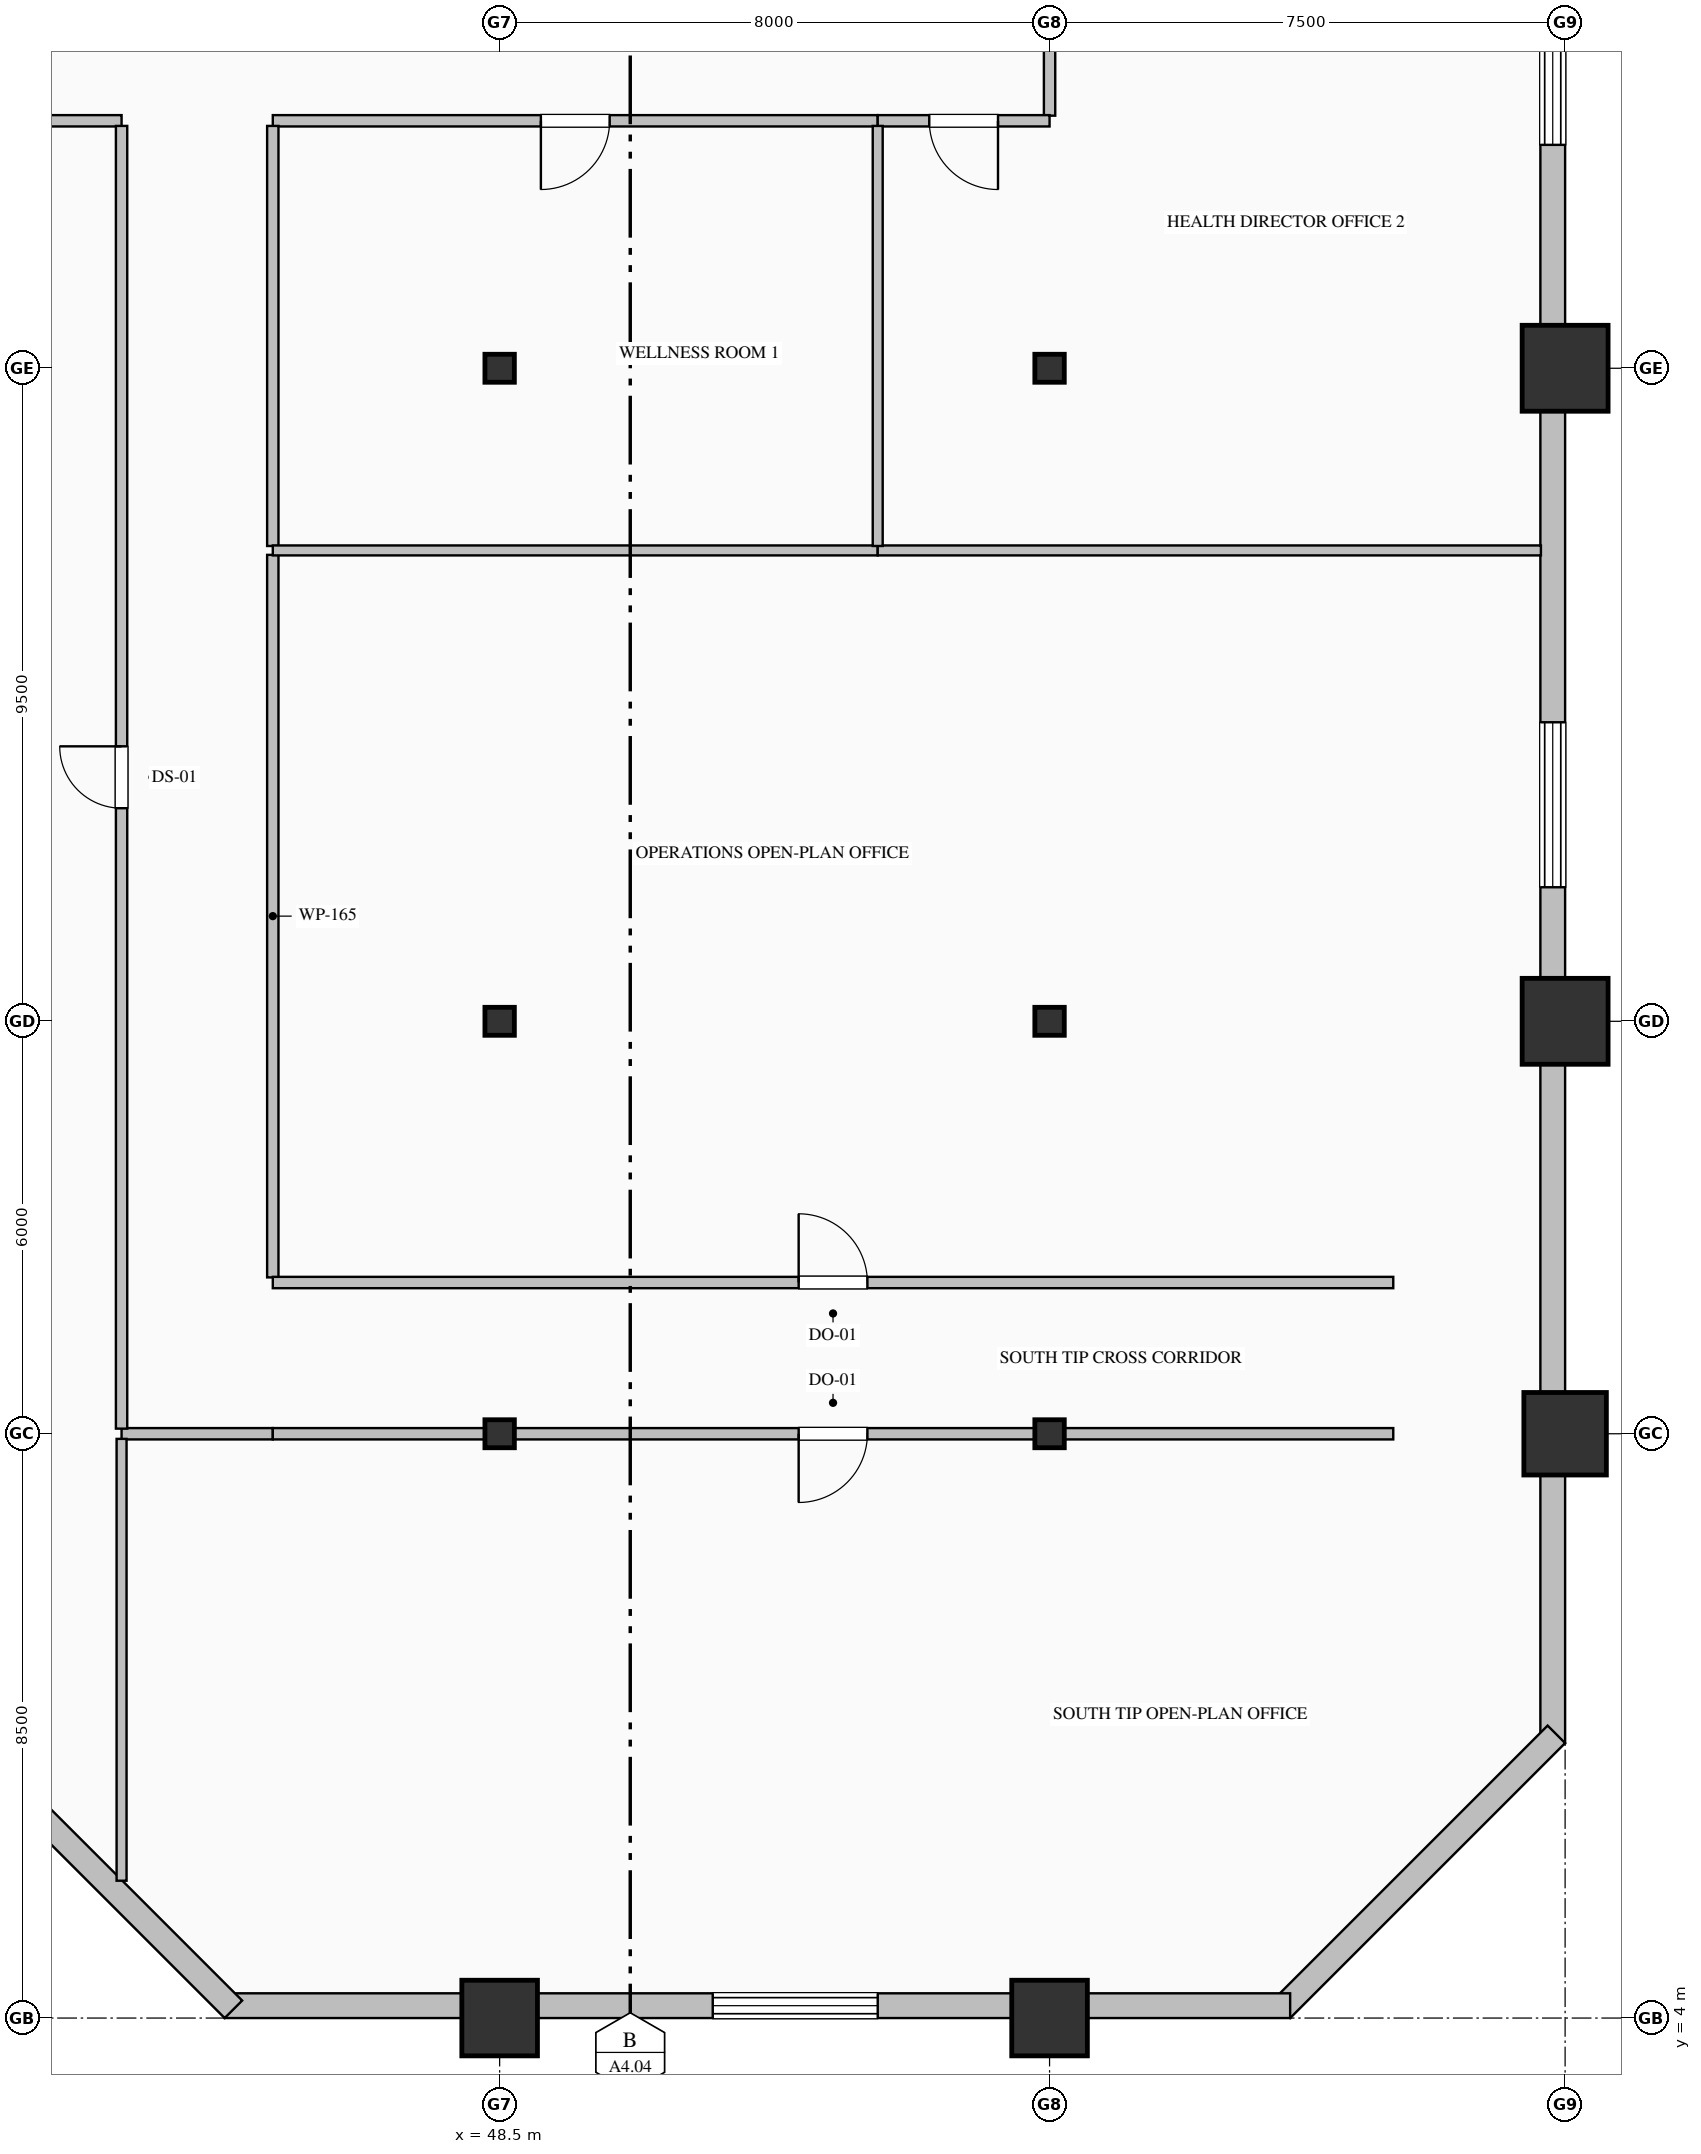
"""IFC4 building model, lengths in metres.
Left out: names, types, materials, properties, quantities, classifications, styles, units other than length and angle.
Written with IfcOpenShell. Run it as: python <this file> out.ifc"""

import sys

from ifc_helpers import new_model, si_unit, direction, frame, frame_2d, origin, origin_2d, place, context, subcontext, project, spatial, rectangle, hollow_rectangle, hollow_circle, i_section, extrude, element, fill, save


model = new_model("IFC4")
c1 = context("Model", 3, precision=1e-05, world=origin(), true_north=direction((0.0, 1.0)))
c2 = subcontext(c1, "Body", "Model", "MODEL_VIEW")
j1 = project(units=[si_unit("LENGTHUNIT", "METRE"), si_unit("PLANEANGLEUNIT", "RADIAN")], contexts=[c1])
p1 = place(None, origin())
s1 = spatial("IfcSite", under=j1, at=p1, CompositionType="ELEMENT")
p2 = place(p1, origin())
s2 = spatial("IfcBuilding", under=s1, at=p2, CompositionType="ELEMENT")
p3 = place(p2, frame((0.0, 0.0, 84.2)))
s3 = spatial("IfcBuildingStorey", under=s2, at=p3, CompositionType="ELEMENT", Elevation=84.2)
p4 = place(p3, frame((48.5, 4.0, 0.0), z_axis=(0.0, 0.0, 1.0), x_axis=(1.0, 0.0, 0.0)))
e1 = element("IfcColumn", 1, at=p4, inside=s3, PredefinedType="COLUMN", context=c2, shape_type="SweptSolid", body=[
    extrude(hollow_rectangle(XDim=1.1, YDim=1.1, WallThickness=0.04, at=origin_2d()), origin(), (0.0, 0.0, 1.0), 4.0),
])
for number, where, z_axis, x_axis in (
    (2, (48.5, 12.5, 0.0), (0.0, 0.0, 1.0), (1.0, 0.0, 0.0)),
    (3, (48.5, 18.5, 0.0), (0.0, 0.0, 1.0), (1.0, 0.0, 0.0)),
    (4, (48.5, 28.0, 0.0), (0.0, 0.0, 1.0), (1.0, 0.0, 0.0)),
):
    element("IfcColumn", number, at=place(p3, frame(where, z_axis=z_axis, x_axis=x_axis)), inside=s3, PredefinedType="COLUMN", context=c2, shape_type="SweptSolid", body=[
        extrude(i_section(OverallWidth=0.407, OverallDepth=0.428, WebThickness=0.02, FlangeThickness=0.035, FilletRadius=0.022, at=origin_2d()), origin(), (0.0, 0.0, 1.0), 4.0),
    ])
p5 = place(p3, frame((56.5, 4.0, 0.0), z_axis=(0.0, 0.0, 1.0), x_axis=(1.0, 0.0, 0.0)))
e5 = element("IfcColumn", 5, at=p5, inside=s3, PredefinedType="COLUMN", context=c2, shape_type="SweptSolid", body=[
    extrude(hollow_rectangle(XDim=1.1, YDim=1.1, WallThickness=0.04, at=origin_2d()), origin(), (0.0, 0.0, 1.0), 4.0),
])
for number, where, z_axis, x_axis in (
    (6, (56.5, 12.5, 0.0), (0.0, 0.0, 1.0), (1.0, 0.0, 0.0)),
    (7, (56.5, 18.5, 0.0), (0.0, 0.0, 1.0), (1.0, 0.0, 0.0)),
    (8, (56.5, 28.0, 0.0), (0.0, 0.0, 1.0), (1.0, 0.0, 0.0)),
):
    element("IfcColumn", number, at=place(p3, frame(where, z_axis=z_axis, x_axis=x_axis)), inside=s3, PredefinedType="COLUMN", context=c2, shape_type="SweptSolid", body=[
        extrude(i_section(OverallWidth=0.407, OverallDepth=0.428, WebThickness=0.02, FlangeThickness=0.035, FilletRadius=0.022, at=origin_2d()), origin(), (0.0, 0.0, 1.0), 4.0),
    ])
p6 = place(p3, frame((64.0, 12.5, 0.0), z_axis=(0.0, 0.0, 1.0), x_axis=(1.0, 0.0, 0.0)))
e9 = element("IfcColumn", 9, at=p6, inside=s3, PredefinedType="COLUMN", context=c2, shape_type="SweptSolid", body=[
    extrude(hollow_circle(Radius=0.6, WallThickness=0.04, at=origin_2d()), origin(), (0.0, 0.0, 1.0), 4.0),
])
for number, where, z_axis, x_axis in (
    (10, (64.0, 18.5, 0.0), (0.0, 0.0, 1.0), (1.0, 0.0, 0.0)),
    (11, (64.0, 28.0, 0.0), (0.0, 0.0, 1.0), (1.0, 0.0, 0.0)),
):
    element("IfcColumn", number, at=place(p3, frame(where, z_axis=z_axis, x_axis=x_axis)), inside=s3, PredefinedType="COLUMN", context=c2, shape_type="SweptSolid", body=[
        extrude(hollow_rectangle(XDim=1.25, YDim=1.25, WallThickness=0.045, at=origin_2d()), origin(), (0.0, 0.0, 1.0), 4.0),
    ])
p7 = place(p3, frame((63.82, 36.05, 0.0), z_axis=(0.0, 0.0, 1.0), x_axis=(0.0, -1.0, 0.0)))
e12 = element("IfcWall", 12, at=p7, inside=s3, PredefinedType="SOLIDWALL", context=c2, shape_type="SweptSolid", body=[
    extrude(rectangle(XDim=28.05, YDim=0.36, at=frame_2d((14.025, 0.0))), origin(), (0.0, 0.0, 1.0), 3.25),
])
p8 = place(p7, frame((2.4, 0.0, 0.8)))
e13 = element("IfcOpeningElement", 13, at=p8, cuts=e12, PredefinedType="OPENING", context=c2, shape_type="SweptSolid", body=[
    extrude(rectangle(XDim=2.4, YDim=2.15, at=frame_2d((1.2, 1.075))), frame((0.0, 0.19, 0.0), z_axis=(0.0, -1.0, 0.0), x_axis=(1.0, 0.0, 0.0)), (0.0, 0.0, 1.0), 0.38),
])
p9 = place(p7, frame((13.2, 0.0, 0.8)))
e14 = element("IfcOpeningElement", 14, at=p9, cuts=e12, PredefinedType="OPENING", context=c2, shape_type="SweptSolid", body=[
    extrude(rectangle(XDim=2.4, YDim=2.15, at=frame_2d((1.2, 1.075))), frame((0.0, 0.19, 0.0), z_axis=(0.0, -1.0, 0.0), x_axis=(1.0, 0.0, 0.0)), (0.0, 0.0, 1.0), 0.38),
])
p10 = place(p3, frame((63.873, 8.127, 0.0), z_axis=(0.0, 0.0, 1.0), x_axis=(-0.707106781187, -0.707106781187, 0.0)))
e15 = element("IfcWall", 15, at=p10, inside=s3, PredefinedType="SOLIDWALL", context=c2, shape_type="SweptSolid", body=[
    extrude(rectangle(XDim=5.657, YDim=0.36, at=frame_2d((2.828, 0.0))), origin(), (0.0, 0.0, 1.0), 3.75),
])
p11 = place(p3, frame((60.0, 4.18, 0.0), z_axis=(0.0, 0.0, 1.0), x_axis=(-1.0, 0.0, 0.0)))
e16 = element("IfcWall", 16, at=p11, inside=s3, PredefinedType="SOLIDWALL", context=c2, shape_type="SweptSolid", body=[
    extrude(rectangle(XDim=15.5, YDim=0.36, at=frame_2d((7.75, 0.0))), origin(), (0.0, 0.0, 1.0), 3.25),
])
p12 = place(p11, frame((6.0, 0.0, 0.8)))
e17 = element("IfcOpeningElement", 17, at=p12, cuts=e16, PredefinedType="OPENING", context=c2, shape_type="SweptSolid", body=[
    extrude(rectangle(XDim=2.4, YDim=2.15, at=frame_2d((1.2, 1.075))), frame((0.0, 0.19, 0.0), z_axis=(0.0, -1.0, 0.0), x_axis=(1.0, 0.0, 0.0)), (0.0, 0.0, 1.0), 0.38),
])
p13 = place(p3, frame((44.627, 4.127, 0.0), z_axis=(0.0, 0.0, 1.0), x_axis=(-0.707106781187, 0.707106781187, 0.0)))
e18 = element("IfcWall", 18, at=p13, inside=s3, PredefinedType="SOLIDWALL", context=c2, shape_type="SweptSolid", body=[
    extrude(rectangle(XDim=5.657, YDim=0.36, at=frame_2d((2.828, 0.0))), origin(), (0.0, 0.0, 1.0), 3.75),
])
p14 = place(p3, frame((54.0, 31.6, 0.0), z_axis=(0.0, 0.0, 1.0), x_axis=(-1.0, 0.0, 0.0)))
e19 = element("IfcWall", 19, at=p14, inside=s3, PredefinedType="PARTITIONING", context=c2, shape_type="SweptSolid", body=[
    extrude(rectangle(XDim=8.8, YDim=0.165, at=frame_2d((4.4, 0.0))), origin(), (0.0, 0.0, 1.0), 3.75),
])
p15 = place(p14, frame((3.9, 0.0, 0.0)))
e20 = element("IfcOpeningElement", 20, at=p15, cuts=e19, PredefinedType="OPENING", context=c2, shape_type="SweptSolid", body=[
    extrude(rectangle(XDim=1.0, YDim=2.15, at=frame_2d((0.5, 1.075))), frame((0.0, 0.093, 0.0), z_axis=(0.0, -1.0, 0.0), x_axis=(1.0, 0.0, 0.0)), (0.0, 0.0, 1.0), 0.185),
])
p16 = place(p3, frame((56.5, 33.726, 0.0), z_axis=(0.0, 0.0, 1.0), x_axis=(0.0, -1.0, 0.0)))
e21 = element("IfcWall", 21, at=p16, inside=s3, PredefinedType="PARTITIONING", context=c2, shape_type="SweptSolid", body=[
    extrude(rectangle(XDim=2.051, YDim=0.165, at=frame_2d((1.025, 0.0))), origin(), (0.0, 0.0, 1.0), 3.042),
])
p17 = place(p3, frame((56.5, 31.6, 0.0), z_axis=(0.0, 0.0, 1.0), x_axis=(-1.0, 0.0, 0.0)))
e22 = element("IfcWall", 22, at=p17, inside=s3, PredefinedType="PARTITIONING", context=c2, shape_type="SweptSolid", body=[
    extrude(rectangle(XDim=2.5, YDim=0.165, at=frame_2d((1.25, 0.0))), origin(), (0.0, 0.0, 1.0), 3.75),
])
p18 = place(p17, frame((0.75, 0.0, 0.0)))
e23 = element("IfcOpeningElement", 23, at=p18, cuts=e22, PredefinedType="OPENING", context=c2, shape_type="SweptSolid", body=[
    extrude(rectangle(XDim=1.0, YDim=2.15, at=frame_2d((0.5, 1.075))), frame((0.0, 0.093, 0.0), z_axis=(0.0, -1.0, 0.0), x_axis=(1.0, 0.0, 0.0)), (0.0, 0.0, 1.0), 0.185),
])
p19 = place(p3, frame((43.0, 31.6, 0.0), z_axis=(0.0, 0.0, 1.0), x_axis=(-1.0, 0.0, 0.0)))
e24 = element("IfcWall", 24, at=p19, inside=s3, PredefinedType="PARTITIONING", context=c2, shape_type="SweptSolid", body=[
    extrude(rectangle(XDim=2.5, YDim=0.165, at=frame_2d((1.25, 0.0))), origin(), (0.0, 0.0, 1.0), 3.75),
])
p20 = place(p3, frame((45.2, 12.5, 0.0), z_axis=(0.0, 0.0, 1.0), x_axis=(-1.0, 0.0, 0.0)))
e25 = element("IfcWall", 25, at=p20, inside=s3, PredefinedType="PARTITIONING", context=c2, shape_type="SweptSolid", body=[
    extrude(rectangle(XDim=2.2, YDim=0.165, at=frame_2d((1.1, 0.0))), origin(), (0.0, 0.0, 1.0), 3.042),
])
p21 = place(p3, frame((45.2, 25.285, 0.0), z_axis=(0.0, 0.0, 1.0), x_axis=(0.0, -1.0, 0.0)))
e26 = element("IfcWall", 26, at=p21, inside=s3, PredefinedType="PARTITIONING", context=c2, shape_type="SweptSolid", body=[
    extrude(rectangle(XDim=10.511, YDim=0.165, at=frame_2d((5.255, 0.0))), origin(), (0.0, 0.0, 1.0), 3.75),
])
p22 = place(p3, frame((45.2, 31.525, 0.0), z_axis=(0.0, 0.0, 1.0), x_axis=(0.0, -1.0, 0.0)))
e27 = element("IfcWall", 27, at=p22, inside=s3, PredefinedType="PARTITIONING", context=c2, shape_type="SweptSolid", body=[
    extrude(rectangle(XDim=6.111, YDim=0.165, at=frame_2d((3.055, 0.0))), origin(), (0.0, 0.0, 1.0), 3.75),
])
p23 = place(p3, frame((43.0, 12.574, 0.0), z_axis=(0.0, 0.0, 1.0), x_axis=(0.0, 1.0, 0.0)))
e28 = element("IfcWall", 28, at=p23, inside=s3, PredefinedType="PARTITIONING", context=c2, shape_type="SweptSolid", body=[
    extrude(rectangle(XDim=18.951, YDim=0.165, at=frame_2d((9.476, 0.0))), origin(), (0.0, 0.0, 1.0), 3.75),
])
p24 = place(p23, frame((9.025, 0.0, 0.0)))
e29 = element("IfcOpeningElement", 29, at=p24, cuts=e28, PredefinedType="OPENING", context=c2, shape_type="SweptSolid", body=[
    extrude(rectangle(XDim=0.9, YDim=2.15, at=frame_2d((0.45, 1.075))), frame((0.0, 0.093, 0.0), z_axis=(0.0, -1.0, 0.0), x_axis=(1.0, 0.0, 0.0)), (0.0, 0.0, 1.0), 0.185),
])
p25 = place(p3, frame((61.5, 12.5, 0.0), z_axis=(0.0, 0.0, 1.0), x_axis=(-1.0, 0.0, 0.0)))
e30 = element("IfcWall", 30, at=p25, inside=s3, PredefinedType="PARTITIONING", context=c2, shape_type="SweptSolid", body=[
    extrude(rectangle(XDim=16.3, YDim=0.165, at=frame_2d((8.15, 0.0))), origin(), (0.0, 0.0, 1.0), 3.042),
])
p26 = place(p25, frame((7.65, 0.0, 0.0)))
e31 = element("IfcOpeningElement", 31, at=p26, cuts=e30, PredefinedType="OPENING", context=c2, shape_type="SweptSolid", body=[
    extrude(rectangle(XDim=1.0, YDim=2.15, at=frame_2d((0.5, 1.075))), frame((0.0, 0.093, 0.0), z_axis=(0.0, -1.0, 0.0), x_axis=(1.0, 0.0, 0.0)), (0.0, 0.0, 1.0), 0.185),
])
p27 = place(p3, frame((45.2, 14.7, 0.0), z_axis=(0.0, 0.0, 1.0), x_axis=(1.0, 0.0, 0.0)))
e32 = element("IfcWall", 32, at=p27, inside=s3, PredefinedType="PARTITIONING", context=c2, shape_type="SweptSolid", body=[
    extrude(rectangle(XDim=16.3, YDim=0.165, at=frame_2d((8.15, 0.0))), origin(), (0.0, 0.0, 1.0), 3.75),
])
p28 = place(p27, frame((7.65, 0.0, 0.0)))
e33 = element("IfcOpeningElement", 33, at=p28, cuts=e32, PredefinedType="OPENING", context=c2, shape_type="SweptSolid", body=[
    extrude(rectangle(XDim=1.0, YDim=2.15, at=frame_2d((0.5, 1.075))), frame((0.0, 0.093, 0.0), z_axis=(0.0, -1.0, 0.0), x_axis=(1.0, 0.0, 0.0)), (0.0, 0.0, 1.0), 0.185),
])
p29 = place(p3, frame((43.0, 5.998, 0.0), z_axis=(0.0, 0.0, 1.0), x_axis=(0.0, 1.0, 0.0)))
e34 = element("IfcWall", 34, at=p29, inside=s3, PredefinedType="PARTITIONING", context=c2, shape_type="SweptSolid", body=[
    extrude(rectangle(XDim=6.428, YDim=0.145, at=frame_2d((3.214, 0.0))), origin(), (0.0, 0.0, 1.0), 3.75),
])
p30 = place(p3, frame((45.2, 25.35, 0.0), z_axis=(0.0, 0.0, 1.0), x_axis=(1.0, 0.0, 0.0)))
e35 = element("IfcWall", 35, at=p30, inside=s3, PredefinedType="PARTITIONING", context=c2, shape_type="SweptSolid", body=[
    extrude(rectangle(XDim=8.8, YDim=0.145, at=frame_2d((4.4, 0.0))), origin(), (0.0, 0.0, 1.0), 3.75),
])
p31 = place(p3, frame((54.0, 25.35, 0.0), z_axis=(0.0, 0.0, 1.0), x_axis=(1.0, 0.0, 0.0)))
e36 = element("IfcWall", 36, at=p31, inside=s3, PredefinedType="PARTITIONING", context=c2, shape_type="SweptSolid", body=[
    extrude(rectangle(XDim=9.648, YDim=0.145, at=frame_2d((4.824, 0.0))), origin(), (0.0, 0.0, 1.0), 3.75),
])
p32 = place(p3, frame((54.0, 31.525, 0.0), z_axis=(0.0, 0.0, 1.0), x_axis=(0.0, -1.0, 0.0)))
e37 = element("IfcWall", 37, at=p32, inside=s3, PredefinedType="PARTITIONING", context=c2, shape_type="SweptSolid", body=[
    extrude(rectangle(XDim=6.111, YDim=0.145, at=frame_2d((3.055, 0.0))), origin(), (0.0, 0.0, 1.0), 3.75),
])
p33 = place(p8, origin())
e38 = element("IfcWindow", 38, at=p33, inside=s3, PartitioningType="TRIPLE_PANEL_VERTICAL", PredefinedType="WINDOW", context=c2, shape_type="SweptSolid", body=[
    extrude(rectangle(XDim=2.4, YDim=2.15, at=frame_2d((1.2, 1.075))), frame((0.0, 0.15, 0.0), z_axis=(0.0, -1.0, 0.0), x_axis=(1.0, 0.0, 0.0)), (0.0, 0.0, 1.0), 0.06),
])
fill(e13, e38)
p34 = place(p9, origin())
e39 = element("IfcWindow", 39, at=p34, inside=s3, PartitioningType="TRIPLE_PANEL_VERTICAL", PredefinedType="WINDOW", context=c2, shape_type="SweptSolid", body=[
    extrude(rectangle(XDim=2.4, YDim=2.15, at=frame_2d((1.2, 1.075))), frame((0.0, 0.15, 0.0), z_axis=(0.0, -1.0, 0.0), x_axis=(1.0, 0.0, 0.0)), (0.0, 0.0, 1.0), 0.06),
])
fill(e14, e39)
p35 = place(p12, origin())
e40 = element("IfcWindow", 40, at=p35, inside=s3, PartitioningType="TRIPLE_PANEL_VERTICAL", PredefinedType="WINDOW", context=c2, shape_type="SweptSolid", body=[
    extrude(rectangle(XDim=2.4, YDim=2.15, at=frame_2d((1.2, 1.075))), frame((0.0, 0.15, 0.0), z_axis=(0.0, -1.0, 0.0), x_axis=(1.0, 0.0, 0.0)), (0.0, 0.0, 1.0), 0.06),
])
fill(e17, e40)
p36 = place(p26, origin())
e41 = element("IfcDoor", 41, at=p36, inside=s3, OperationType="SINGLE_SWING_RIGHT", PredefinedType="DOOR", context=c2, shape_type="SweptSolid", body=[
    extrude(rectangle(XDim=1.0, YDim=2.15, at=frame_2d((0.5, 1.075))), frame((0.0, 0.025, 0.0), z_axis=(0.0, -1.0, 0.0), x_axis=(1.0, 0.0, 0.0)), (0.0, 0.0, 1.0), 0.05),
])
fill(e31, e41)
p37 = place(p28, origin())
e42 = element("IfcDoor", 42, at=p37, inside=s3, OperationType="SINGLE_SWING_LEFT", PredefinedType="DOOR", context=c2, shape_type="SweptSolid", body=[
    extrude(rectangle(XDim=1.0, YDim=2.15, at=frame_2d((0.5, 1.075))), frame((0.0, 0.025, 0.0), z_axis=(0.0, -1.0, 0.0), x_axis=(1.0, 0.0, 0.0)), (0.0, 0.0, 1.0), 0.05),
])
fill(e33, e42)
p38 = place(p15, origin())
e43 = element("IfcDoor", 43, at=p38, inside=s3, OperationType="SINGLE_SWING_RIGHT", PredefinedType="DOOR", context=c2, shape_type="SweptSolid", body=[
    extrude(rectangle(XDim=1.0, YDim=2.15, at=frame_2d((0.5, 1.075))), frame((0.0, 0.025, 0.0), z_axis=(0.0, -1.0, 0.0), x_axis=(1.0, 0.0, 0.0)), (0.0, 0.0, 1.0), 0.05),
])
fill(e20, e43)
p39 = place(p18, origin())
e44 = element("IfcDoor", 44, at=p39, inside=s3, OperationType="SINGLE_SWING_LEFT", PredefinedType="DOOR", context=c2, shape_type="SweptSolid", body=[
    extrude(rectangle(XDim=1.0, YDim=2.15, at=frame_2d((0.5, 1.075))), frame((0.0, 0.025, 0.0), z_axis=(0.0, -1.0, 0.0), x_axis=(1.0, 0.0, 0.0)), (0.0, 0.0, 1.0), 0.05),
])
fill(e23, e44)
p40 = place(p24, origin())
e45 = element("IfcDoor", 45, at=p40, inside=s3, OperationType="SINGLE_SWING_RIGHT", PredefinedType="DOOR", context=c2, shape_type="SweptSolid", body=[
    extrude(rectangle(XDim=0.9, YDim=2.15, at=frame_2d((0.45, 1.075))), frame((0.0, 0.025, 0.0), z_axis=(0.0, -1.0, 0.0), x_axis=(1.0, 0.0, 0.0)), (0.0, 0.0, 1.0), 0.05),
])
fill(e29, e45)
save(model, sys.argv[1])
